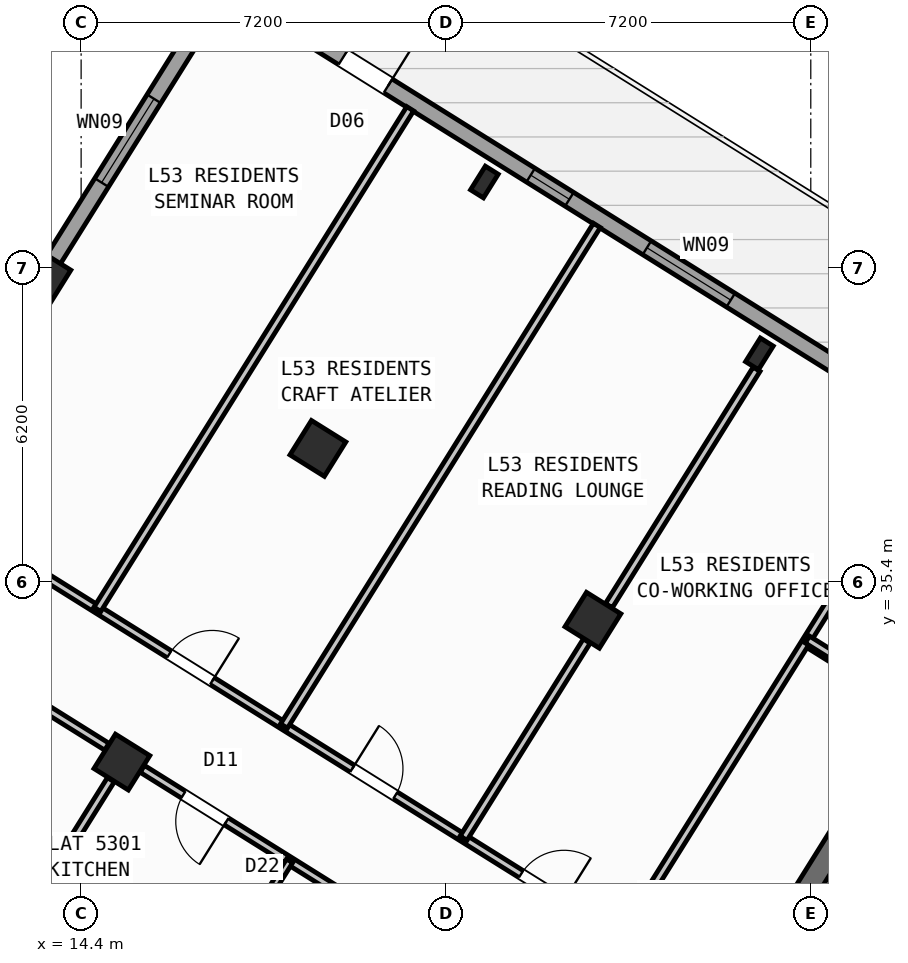
"""IFC4 building model, lengths in metres.
Left out: names, types, materials, properties, quantities, classifications, styles, units other than length and angle.
Written with IfcOpenShell. Run it as: python <this file> out.ifc"""

import sys

from ifc_helpers import new_model, si_unit, direction, frame, frame_2d, origin, origin_2d, place, context, subcontext, project, spatial, rectangle, hollow_rectangle, i_section, extrude, source, transform, mapped, element, fill, save


model = new_model("IFC4")
c1 = context("Model", 3, precision=1e-05, world=origin(), true_north=direction((0.0, 1.0)))
c2 = subcontext(c1, "Body", "Model", "MODEL_VIEW")
j1 = project(units=[si_unit("LENGTHUNIT", "METRE"), si_unit("PLANEANGLEUNIT", "RADIAN")], contexts=[c1])
p1 = place(None, origin())
s1 = spatial("IfcSite", under=j1, at=p1, CompositionType="ELEMENT")
p2 = place(p1, origin())
s2 = spatial("IfcBuilding", under=s1, at=p2, CompositionType="ELEMENT")
p3 = place(p2, frame((0.0, 0.0, 211.2)))
s3 = spatial("IfcBuildingStorey", under=s2, at=p3, CompositionType="ELEMENT", Elevation=211.2)
p4 = place(p3, frame((29.544, 30.636, 0.0), z_axis=(0.0, 0.0, 1.0), x_axis=(-0.529902075036, -0.848058836916, 0.0)))
e1 = element("IfcWall", 1, at=p4, inside=s3, PredefinedType="SHEAR", context=c2, shape_type="SweptSolid", body=[
    extrude(rectangle(XDim=3.625, YDim=0.45, at=frame_2d((1.812, 0.0))), origin(), (0.0, 0.0, 1.0), 3.35),
])
m1 = source(origin(), c2, "Body", "SweptSolid", [
    extrude(i_section(OverallWidth=0.3, OverallDepth=0.55, WebThickness=0.015, FlangeThickness=0.029, at=origin_2d()), origin(), (0.0, 0.0, 1.0), 3.6),
])
p5 = place(p3, frame((27.786, 39.901, 0.0), z_axis=(0.0, 0.0, 1.0), x_axis=(-0.848048096156, 0.529919264233, 0.0)))
e2 = element("IfcColumn", 2, at=p5, inside=s3, PredefinedType="COLUMN", context=c2, shape_type="MappedRepresentation", body=[
    mapped(m1, transform((0.0, 0.0, 0.0), scale=1.0)),
])
m2 = source(origin(), c2, "Body", "SweptSolid", [
    extrude(hollow_rectangle(XDim=0.8, YDim=0.8, WallThickness=0.032, at=origin_2d()), origin(), (0.0, 0.0, 1.0), 3.6),
])
p6 = place(p3, frame((24.5, 34.643, 0.0), z_axis=(0.0, 0.0, 1.0), x_axis=(-0.848048096156, 0.529919264233, 0.0)))
e3 = element("IfcColumn", 3, at=p6, inside=s3, PredefinedType="COLUMN", context=c2, shape_type="MappedRepresentation", body=[
    mapped(m2, transform((0.0, 0.0, 0.0), scale=1.0)),
])
p7 = place(p3, frame((22.358, 43.292, 0.0), z_axis=(0.0, 0.0, 1.0), x_axis=(-0.848048096156, 0.529919264233, 0.0)))
e4 = element("IfcColumn", 4, at=p7, inside=s3, PredefinedType="COLUMN", context=c2, shape_type="MappedRepresentation", body=[
    mapped(m1, transform((0.0, 0.0, 0.0), scale=1.0)),
])
for number, where, z_axis, x_axis in (
    (5, (19.073, 38.034, 0.0), (0.0, 0.0, 1.0), (-0.848, 0.53, 0.0)),
    (6, (15.205, 31.844, 0.0), (0.0, 0.0, 1.0), (-0.848, 0.53, 0.0)),
    (7, (13.646, 41.426, 0.0), (0.0, 0.0, 1.0), (-0.848, 0.53, 0.0)),
):
    element("IfcColumn", number, at=place(p3, frame(where, z_axis=z_axis, x_axis=x_axis)), inside=s3, PredefinedType="COLUMN", context=c2, shape_type="MappedRepresentation", body=[
        mapped(m2, transform((0.0, 0.0, 0.0), scale=1.0)),
    ])
p8 = place(p3, frame((5.7, 28.71, 0.0), z_axis=(0.0, 0.0, 1.0), x_axis=(0.529923711467, 0.8480453172, 0.0)))
e8 = element("IfcWall", 8, at=p8, inside=s3, PredefinedType="STANDARD", context=c2, shape_type="SweptSolid", body=[
    extrude(rectangle(XDim=21.587, YDim=0.32, at=frame_2d((10.794, 0.0))), origin(), (0.0, 0.0, 1.0), 2.825),
])
p9 = place(p8, frame((2.184, 0.0, 0.9)))
e9 = element("IfcOpeningElement", 9, at=p9, cuts=e8, PredefinedType="OPENING", context=c2, shape_type="SweptSolid", body=[
    extrude(rectangle(XDim=1.65, YDim=1.45, at=frame_2d((0.825, 0.725))), frame((0.0, 0.17, 0.0), z_axis=(0.0, -1.0, 0.0), x_axis=(1.0, 0.0, 0.0)), (0.0, 0.0, 1.0), 0.34),
])
p10 = place(p8, frame((11.709, 0.0, 0.9)))
e10 = element("IfcOpeningElement", 10, at=p10, cuts=e8, PredefinedType="OPENING", context=c2, shape_type="SweptSolid", body=[
    extrude(rectangle(XDim=1.35, YDim=1.45, at=frame_2d((0.675, 0.725))), frame((0.0, 0.17, 0.0), z_axis=(0.0, -1.0, 0.0), x_axis=(1.0, 0.0, 0.0)), (0.0, 0.0, 1.0), 0.34),
])
p11 = place(p8, frame((17.181, 0.0, 0.95)))
e11 = element("IfcOpeningElement", 11, at=p11, cuts=e8, PredefinedType="OPENING", context=c2, shape_type="SweptSolid", body=[
    extrude(rectangle(XDim=1.95, YDim=1.35, at=frame_2d((0.975, 0.675))), frame((0.0, 0.17, 0.0), z_axis=(0.0, -1.0, 0.0), x_axis=(1.0, 0.0, 0.0)), (0.0, 0.0, 1.0), 0.34),
])
p12 = place(p3, frame((17.424, 47.083, 0.0), z_axis=(0.0, 0.0, 1.0), x_axis=(0.848049927979, -0.529916332693, 0.0)))
e12 = element("IfcWall", 12, at=p12, inside=s3, PredefinedType="STANDARD", context=c2, shape_type="SweptSolid", body=[
    extrude(rectangle(XDim=29.223, YDim=0.32, at=frame_2d((14.612, 0.0))), origin(), (0.0, 0.0, 1.0), 3.35),
])
p13 = place(p12, frame((2.526, 0.0, 0.0)))
e13 = element("IfcOpeningElement", 13, at=p13, cuts=e12, PredefinedType="OPENING", context=c2, shape_type="SweptSolid", body=[
    extrude(rectangle(XDim=1.05, YDim=2.15, at=frame_2d((0.525, 1.075))), frame((0.0, 0.17, 0.0), z_axis=(0.0, -1.0, 0.0), x_axis=(1.0, 0.0, 0.0)), (0.0, 0.0, 1.0), 0.34),
])
p14 = place(p12, frame((0.653, 0.0, 0.9)))
e14 = element("IfcOpeningElement", 14, at=p14, cuts=e12, PredefinedType="OPENING", context=c2, shape_type="SweptSolid", body=[
    extrude(rectangle(XDim=1.35, YDim=1.45, at=frame_2d((0.675, 0.725))), frame((0.0, 0.17, 0.0), z_axis=(0.0, -1.0, 0.0), x_axis=(1.0, 0.0, 0.0)), (0.0, 0.0, 1.0), 0.34),
])
p15 = place(p12, frame((6.897, 0.0, 1.0)))
e15 = element("IfcOpeningElement", 15, at=p15, cuts=e12, PredefinedType="OPENING", context=c2, shape_type="SweptSolid", body=[
    extrude(rectangle(XDim=0.9, YDim=1.25, at=frame_2d((0.45, 0.625))), frame((0.0, 0.17, 0.0), z_axis=(0.0, -1.0, 0.0), x_axis=(1.0, 0.0, 0.0)), (0.0, 0.0, 1.0), 0.34),
])
p16 = place(p12, frame((9.602, 0.0, 0.95)))
e16 = element("IfcOpeningElement", 16, at=p16, cuts=e12, PredefinedType="OPENING", context=c2, shape_type="SweptSolid", body=[
    extrude(rectangle(XDim=1.95, YDim=1.35, at=frame_2d((0.975, 0.675))), frame((0.0, 0.17, 0.0), z_axis=(0.0, -1.0, 0.0), x_axis=(1.0, 0.0, 0.0)), (0.0, 0.0, 1.0), 0.34),
])
p17 = place(p12, frame((14.096, 0.0, 1.0)))
e17 = element("IfcOpeningElement", 17, at=p17, cuts=e12, PredefinedType="OPENING", context=c2, shape_type="SweptSolid", body=[
    extrude(rectangle(XDim=0.9, YDim=1.25, at=frame_2d((0.45, 0.625))), frame((0.0, 0.17, 0.0), z_axis=(0.0, -1.0, 0.0), x_axis=(1.0, 0.0, 0.0)), (0.0, 0.0, 1.0), 0.34),
])
p18 = place(p12, frame((17.254, 0.0, 1.0)))
e18 = element("IfcOpeningElement", 18, at=p18, cuts=e12, PredefinedType="OPENING", context=c2, shape_type="SweptSolid", body=[
    extrude(rectangle(XDim=0.9, YDim=1.25, at=frame_2d((0.45, 0.625))), frame((0.0, 0.17, 0.0), z_axis=(0.0, -1.0, 0.0), x_axis=(1.0, 0.0, 0.0)), (0.0, 0.0, 1.0), 0.34),
])
p19 = place(p12, frame((21.139, 0.0, 0.9)))
e19 = element("IfcOpeningElement", 19, at=p19, cuts=e12, PredefinedType="OPENING", context=c2, shape_type="SweptSolid", body=[
    extrude(rectangle(XDim=1.35, YDim=1.45, at=frame_2d((0.675, 0.725))), frame((0.0, 0.17, 0.0), z_axis=(0.0, -1.0, 0.0), x_axis=(1.0, 0.0, 0.0)), (0.0, 0.0, 1.0), 0.34),
])
p20 = place(p12, frame((25.778, 0.0, 0.9)))
e20 = element("IfcOpeningElement", 20, at=p20, cuts=e12, PredefinedType="OPENING", context=c2, shape_type="SweptSolid", body=[
    extrude(rectangle(XDim=1.35, YDim=1.45, at=frame_2d((0.675, 0.725))), frame((0.0, 0.17, 0.0), z_axis=(0.0, -1.0, 0.0), x_axis=(1.0, 0.0, 0.0)), (0.0, 0.0, 1.0), 0.34),
])
p21 = place(p3, frame((30.914, 32.829, 0.0), z_axis=(0.0, 0.0, 1.0), x_axis=(-0.848008813643, 0.529982124211, 0.0)))
e21 = element("IfcWall", 21, at=p21, inside=s3, PredefinedType="PARTITIONING", context=c2, shape_type="SweptSolid", body=[
    extrude(rectangle(XDim=2.61, YDim=0.16, at=frame_2d((1.305, 0.0))), origin(), (0.0, 0.0, 1.0), 3.34),
])
p22 = place(p3, frame((31.239, 38.274, 0.0), z_axis=(0.0, 0.0, 1.0), x_axis=(-0.529925472745, -0.848044216616, 0.0)))
e22 = element("IfcWall", 22, at=p22, inside=s3, PredefinedType="PARTITIONING", context=c2, shape_type="SweptSolid", body=[
    extrude(rectangle(XDim=11.65, YDim=0.16, at=frame_2d((5.825, 0.0))), origin(), (0.0, 0.0, 1.0), 3.34),
])
p23 = place(p3, frame((25.065, 28.394, 0.0), z_axis=(0.0, 0.0, 1.0), x_axis=(-0.848048310262, 0.529918921593, 0.0)))
e23 = element("IfcWall", 23, at=p23, inside=s3, PredefinedType="PARTITIONING", context=c2, shape_type="SweptSolid", body=[
    extrude(rectangle(XDim=16.73, YDim=0.16, at=frame_2d((8.365, 0.0))), origin(), (0.0, 0.0, 1.0), 3.34),
])
p24 = place(p23, frame((1.338, 0.0, 0.0)))
e24 = element("IfcOpeningElement", 24, at=p24, cuts=e23, PredefinedType="OPENING", context=c2, shape_type="SweptSolid", body=[
    extrude(rectangle(XDim=1.0, YDim=2.1, at=frame_2d((0.5, 1.05))), frame((0.0, 0.09, 0.0), z_axis=(0.0, -1.0, 0.0), x_axis=(1.0, 0.0, 0.0)), (0.0, 0.0, 1.0), 0.18),
])
p25 = place(p23, frame((5.265, 0.0, 0.0)))
e25 = element("IfcOpeningElement", 25, at=p25, cuts=e23, PredefinedType="OPENING", context=c2, shape_type="SweptSolid", body=[
    extrude(rectangle(XDim=1.0, YDim=2.1, at=frame_2d((0.5, 1.05))), frame((0.0, 0.09, 0.0), z_axis=(0.0, -1.0, 0.0), x_axis=(1.0, 0.0, 0.0)), (0.0, 0.0, 1.0), 0.18),
])
p26 = place(p23, frame((9.526, 0.0, 0.0)))
e26 = element("IfcOpeningElement", 26, at=p26, cuts=e23, PredefinedType="OPENING", context=c2, shape_type="SweptSolid", body=[
    extrude(rectangle(XDim=1.0, YDim=2.1, at=frame_2d((0.5, 1.05))), frame((0.0, 0.09, 0.0), z_axis=(0.0, -1.0, 0.0), x_axis=(1.0, 0.0, 0.0)), (0.0, 0.0, 1.0), 0.18),
])
p27 = place(p23, frame((13.954, 0.0, 0.0)))
e27 = element("IfcOpeningElement", 27, at=p27, cuts=e23, PredefinedType="OPENING", context=c2, shape_type="SweptSolid", body=[
    extrude(rectangle(XDim=1.0, YDim=2.1, at=frame_2d((0.5, 1.05))), frame((0.0, 0.09, 0.0), z_axis=(0.0, -1.0, 0.0), x_axis=(1.0, 0.0, 0.0)), (0.0, 0.0, 1.0), 0.18),
])
p28 = place(p3, frame((20.336, 28.755, 0.0), z_axis=(0.0, 0.0, 1.0), x_axis=(-0.848049955116, 0.529916289265, 0.0)))
e28 = element("IfcWall", 28, at=p28, inside=s3, PredefinedType="PARTITIONING", context=c2, shape_type="SweptSolid", body=[
    extrude(rectangle(XDim=5.576, YDim=0.16, at=frame_2d((2.788, 0.0))), origin(), (0.0, 0.0, 1.0), 2.825),
])
p29 = place(p28, frame((3.618, 0.0, 0.0)))
e29 = element("IfcOpeningElement", 29, at=p29, cuts=e28, PredefinedType="OPENING", context=c2, shape_type="SweptSolid", body=[
    extrude(rectangle(XDim=1.0, YDim=2.1, at=frame_2d((0.5, 1.05))), frame((0.0, 0.09, 0.0), z_axis=(0.0, -1.0, 0.0), x_axis=(1.0, 0.0, 0.0)), (0.0, 0.0, 1.0), 0.18),
])
p30 = place(p3, frame((14.908, 32.147, 0.0), z_axis=(0.0, 0.0, 1.0), x_axis=(-0.848049955116, 0.529916289265, 0.0)))
e30 = element("IfcWall", 30, at=p30, inside=s3, PredefinedType="PARTITIONING", context=c2, shape_type="SweptSolid", body=[
    extrude(rectangle(XDim=5.576, YDim=0.16, at=frame_2d((2.788, 0.0))), origin(), (0.0, 0.0, 1.0), 2.825),
])
p31 = place(p30, frame((4.158, 0.0, 0.0)))
e31 = element("IfcOpeningElement", 31, at=p31, cuts=e30, PredefinedType="OPENING", context=c2, shape_type="SweptSolid", body=[
    extrude(rectangle(XDim=1.0, YDim=2.1, at=frame_2d((0.5, 1.05))), frame((0.0, 0.09, 0.0), z_axis=(0.0, -1.0, 0.0), x_axis=(1.0, 0.0, 0.0)), (0.0, 0.0, 1.0), 0.18),
])
p32 = place(p3, frame((14.986, 31.494, 0.0), z_axis=(0.0, 0.0, 1.0), x_axis=(-0.529907440938, -0.848055484057, 0.0)))
e32 = element("IfcWall", 32, at=p32, inside=s3, PredefinedType="PARTITIONING", context=c2, shape_type="SweptSolid", body=[
    extrude(rectangle(XDim=6.476, YDim=0.16, at=frame_2d((3.238, 0.0))), origin(), (0.0, 0.0, 1.0), 2.825),
])
p33 = place(p3, frame((19.318, 26.349, 0.0), z_axis=(0.0, 0.0, 1.0), x_axis=(-0.848039019877, 0.529933789039, 0.0)))
e33 = element("IfcWall", 33, at=p33, inside=s3, PredefinedType="PLUMBINGWALL", context=c2, shape_type="SweptSolid", body=[
    extrude(rectangle(XDim=6.4, YDim=0.14, at=frame_2d((3.2, 0.0))), origin(), (0.0, 0.0, 1.0), 3.34),
])
p34 = place(p33, frame((2.824, 0.0, 0.0)))
e34 = element("IfcOpeningElement", 34, at=p34, cuts=e33, PredefinedType="OPENING", context=c2, shape_type="SweptSolid", body=[
    extrude(rectangle(XDim=0.78, YDim=2.05, at=frame_2d((0.39, 1.025))), frame((0.0, 0.08, 0.0), z_axis=(0.0, -1.0, 0.0), x_axis=(1.0, 0.0, 0.0)), (0.0, 0.0, 1.0), 0.16),
])
p35 = place(p3, frame((18.514, 29.894, 0.0), z_axis=(0.0, 0.0, 1.0), x_axis=(-0.529913878929, -0.848051461244, 0.0)))
e35 = element("IfcWall", 35, at=p35, inside=s3, PredefinedType="PLUMBINGWALL", context=c2, shape_type="SweptSolid", body=[
    extrude(rectangle(XDim=2.58, YDim=0.14, at=frame_2d((1.29, 0.0))), origin(), (0.0, 0.0, 1.0), 3.34),
])
p36 = place(p35, frame((0.9, 0.0, 0.0)))
e36 = element("IfcOpeningElement", 36, at=p36, cuts=e35, PredefinedType="OPENING", context=c2, shape_type="SweptSolid", body=[
    extrude(rectangle(XDim=0.78, YDim=2.05, at=frame_2d((0.39, 1.025))), frame((0.0, 0.08, 0.0), z_axis=(0.0, -1.0, 0.0), x_axis=(1.0, 0.0, 0.0)), (0.0, 0.0, 1.0), 0.16),
])
p37 = place(p3, frame((13.986, 29.893, 0.0), z_axis=(0.0, 0.0, 1.0), x_axis=(-0.848051346257, 0.52991406295, 0.0)))
e37 = element("IfcWall", 37, at=p37, inside=s3, PredefinedType="PLUMBINGWALL", context=c2, shape_type="SweptSolid", body=[
    extrude(rectangle(XDim=3.62, YDim=0.14, at=frame_2d((1.81, 0.0))), origin(), (0.0, 0.0, 1.0), 3.34),
])
p38 = place(p3, frame((27.73, 39.597, 0.0), z_axis=(0.0, 0.0, 1.0), x_axis=(-0.529919150083, -0.848048167486, 0.0)))
e38 = element("IfcWall", 38, at=p38, inside=s3, PredefinedType="PARTITIONING", context=c2, shape_type="SweptSolid", body=[
    extrude(rectangle(XDim=5.501, YDim=0.16, at=frame_2d((2.75, 0.0))), origin(), (0.0, 0.0, 1.0), 2.825),
])
p39 = place(p3, frame((24.379, 34.233, 0.0), z_axis=(0.0, 0.0, 1.0), x_axis=(-0.529922402838, -0.84804613493, 0.0)))
e39 = element("IfcWall", 39, at=p39, inside=s3, PredefinedType="PARTITIONING", context=c2, shape_type="SweptSolid", body=[
    extrude(rectangle(XDim=4.588, YDim=0.16, at=frame_2d((2.294, 0.0))), origin(), (0.0, 0.0, 1.0), 2.825),
])
for number, where, z_axis, x_axis in (
    (40, (24.578, 42.436, 0.0), (0.0, 0.0, 1.0), (-0.53, -0.848, 0.0)),
    (41, (20.894, 44.738, 0.0), (0.0, 0.0, 1.0), (-0.53, -0.848, 0.0)),
):
    element("IfcWall", number, at=place(p3, frame(where, z_axis=z_axis, x_axis=x_axis)), inside=s3, PredefinedType="PARTITIONING", context=c2, shape_type="SweptSolid", body=[
        extrude(rectangle(XDim=11.65, YDim=0.16, at=frame_2d((5.825, 0.0))), origin(), (0.0, 0.0, 1.0), 2.995),
    ])
p40 = place(p3, frame((41.936, 26.012, 0.0), z_axis=(0.0, 0.0, 1.0), x_axis=(-0.848051154596, 0.529914369676, 0.0)))
e42 = element("IfcWall", 42, at=p40, inside=s3, PredefinedType="PARTITIONING", context=c2, shape_type="SweptSolid", body=[
    extrude(rectangle(XDim=15.57, YDim=0.16, at=frame_2d((7.785, 0.0))), origin(), (0.0, 0.0, 1.0), 3.34),
])
p41 = place(p40, frame((10.83, 0.0, 0.0)))
e43 = element("IfcOpeningElement", 43, at=p41, cuts=e42, PredefinedType="OPENING", context=c2, shape_type="SweptSolid", body=[
    extrude(rectangle(XDim=1.0, YDim=2.1, at=frame_2d((0.5, 1.05))), frame((0.0, 0.09, 0.0), z_axis=(0.0, -1.0, 0.0), x_axis=(1.0, 0.0, 0.0)), (0.0, 0.0, 1.0), 0.18),
])
m3 = source(origin(), c2, "Body", "SweptSolid", [
    extrude(rectangle(XDim=1.05, YDim=2.15, at=frame_2d((0.525, 1.075))), frame((0.0, 0.025, 0.0), z_axis=(0.0, -1.0, 0.0), x_axis=(1.0, 0.0, 0.0)), (0.0, 0.0, 1.0), 0.05),
])
p42 = place(p13, origin())
e44 = element("IfcDoor", 44, at=p42, inside=s3, OperationType="SINGLE_SWING_RIGHT", PredefinedType="DOOR", context=c2, shape_type="MappedRepresentation", body=[
    mapped(m3, transform((0.0, 0.0, 0.0), scale=1.0)),
])
fill(e13, e44)
m4 = source(origin(), c2, "Body", "SweptSolid", [
    extrude(rectangle(XDim=1.95, YDim=1.35, at=frame_2d((0.975, 0.675))), frame((0.0, 0.03, 0.0), z_axis=(0.0, -1.0, 0.0), x_axis=(1.0, 0.0, 0.0)), (0.0, 0.0, 1.0), 0.06),
])
p43 = place(p11, origin())
e45 = element("IfcWindow", 45, at=p43, inside=s3, PartitioningType="SINGLE_PANEL", PredefinedType="WINDOW", context=c2, shape_type="MappedRepresentation", body=[
    mapped(m4, transform((0.0, 0.0, 0.0), scale=1.0)),
])
fill(e11, e45)
m5 = source(origin(), c2, "Body", "SweptSolid", [
    extrude(rectangle(XDim=0.9, YDim=1.25, at=frame_2d((0.45, 0.625))), frame((0.0, 0.03, 0.0), z_axis=(0.0, -1.0, 0.0), x_axis=(1.0, 0.0, 0.0)), (0.0, 0.0, 1.0), 0.06),
])
p44 = place(p15, origin())
e46 = element("IfcWindow", 46, at=p44, inside=s3, PartitioningType="SINGLE_PANEL", PredefinedType="WINDOW", context=c2, shape_type="MappedRepresentation", body=[
    mapped(m5, transform((0.0, 0.0, 0.0), scale=1.0)),
])
fill(e15, e46)
p45 = place(p16, origin())
e47 = element("IfcWindow", 47, at=p45, inside=s3, PartitioningType="SINGLE_PANEL", PredefinedType="WINDOW", context=c2, shape_type="MappedRepresentation", body=[
    mapped(m4, transform((0.0, 0.0, 0.0), scale=1.0)),
])
fill(e16, e47)
m6 = source(origin(), c2, "Body", "SweptSolid", [
    extrude(rectangle(XDim=1.0, YDim=2.1, at=frame_2d((0.5, 1.05))), frame((0.0, 0.025, 0.0), z_axis=(0.0, -1.0, 0.0), x_axis=(1.0, 0.0, 0.0)), (0.0, 0.0, 1.0), 0.05),
])
p46 = place(p29, origin())
e48 = element("IfcDoor", 48, at=p46, inside=s3, OperationType="SINGLE_SWING_LEFT", PredefinedType="DOOR", context=c2, shape_type="MappedRepresentation", body=[
    mapped(m6, transform((0.0, 0.0, 0.0), scale=1.0)),
])
fill(e29, e48)
p47 = place(p24, frame((1.0, 0.0, 0.0), z_axis=(0.0, 0.0, 1.0), x_axis=(-1.0, 0.0, 0.0)))
e49 = element("IfcDoor", 49, at=p47, inside=s3, OperationType="SINGLE_SWING_RIGHT", PredefinedType="DOOR", context=c2, shape_type="MappedRepresentation", body=[
    mapped(m6, transform((0.0, 0.0, 0.0), scale=1.0)),
])
fill(e24, e49)
p48 = place(p25, frame((1.0, 0.0, 0.0), z_axis=(0.0, 0.0, 1.0), x_axis=(-1.0, 0.0, 0.0)))
e50 = element("IfcDoor", 50, at=p48, inside=s3, OperationType="SINGLE_SWING_LEFT", PredefinedType="DOOR", context=c2, shape_type="MappedRepresentation", body=[
    mapped(m6, transform((0.0, 0.0, 0.0), scale=1.0)),
])
fill(e25, e50)
p49 = place(p26, frame((1.0, 0.0, 0.0), z_axis=(0.0, 0.0, 1.0), x_axis=(-1.0, 0.0, 0.0)))
e51 = element("IfcDoor", 51, at=p49, inside=s3, OperationType="SINGLE_SWING_RIGHT", PredefinedType="DOOR", context=c2, shape_type="MappedRepresentation", body=[
    mapped(m6, transform((0.0, 0.0, 0.0), scale=1.0)),
])
fill(e26, e51)
save(model, sys.argv[1])
